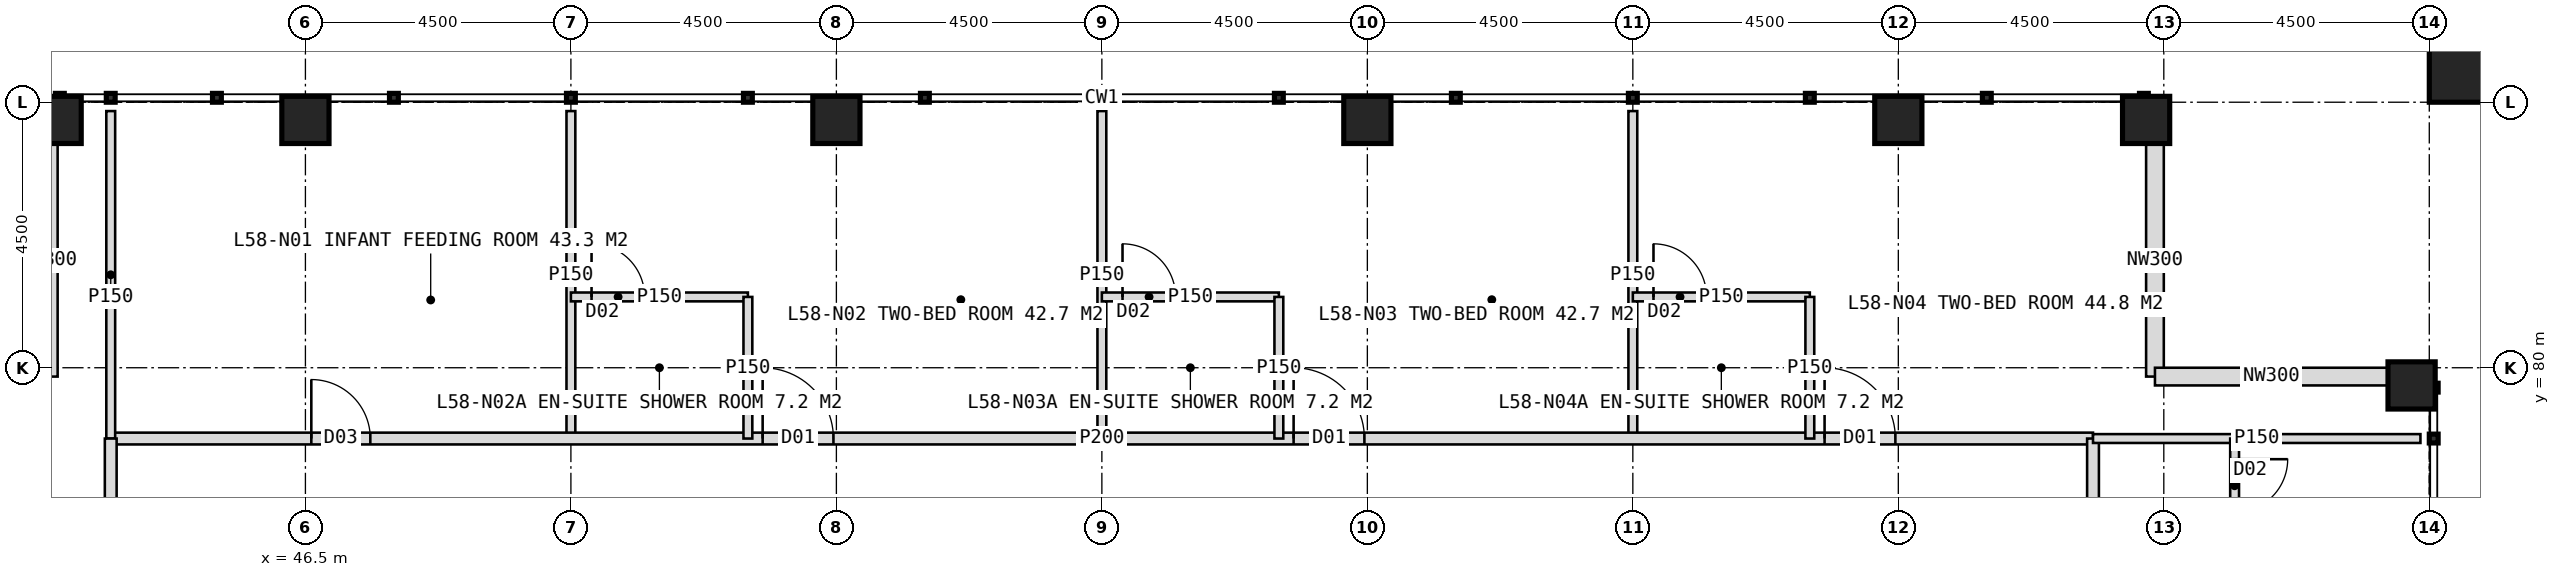
"""IFC4 building model, lengths in metres.
Left out: names, types, materials, properties, quantities, classifications, styles, units other than length and angle.
Written with IfcOpenShell. Run it as: python <this file> out.ifc"""

import sys

from ifc_helpers import new_model, si_unit, direction, frame, frame_2d, origin, origin_2d, place, context, subcontext, project, spatial, rectangle, hollow_rectangle, extrude, element, fill, save


model = new_model("IFC4")
c1 = context("Model", 3, precision=1e-05, world=origin(), true_north=direction((0.0, 1.0)))
c2 = subcontext(c1, "Body", "Model", "MODEL_VIEW")
j1 = project(units=[si_unit("LENGTHUNIT", "METRE"), si_unit("PLANEANGLEUNIT", "RADIAN")], contexts=[c1])
p1 = place(None, origin())
s1 = spatial("IfcSite", under=j1, at=p1, CompositionType="ELEMENT")
p2 = place(p1, origin())
s2 = spatial("IfcBuilding", under=s1, at=p2, CompositionType="ELEMENT")
p3 = place(p2, frame((0.0, 0.0, 241.0)))
s3 = spatial("IfcBuildingStorey", under=s2, at=p3, CompositionType="ELEMENT", Elevation=241.0)
for number, where, z_axis, x_axis in (
    (1, (42.3, 84.2, 0.0), (0.0, 0.0, 1.0), (1.0, 0.0, 0.0)),
    (2, (46.5, 84.2, 0.0), (0.0, 0.0, 1.0), (1.0, 0.0, 0.0)),
    (3, (55.5, 84.2, 0.0), (0.0, 0.0, 1.0), (1.0, 0.0, 0.0)),
    (4, (64.5, 84.2, 0.0), (0.0, 0.0, 1.0), (1.0, 0.0, 0.0)),
    (5, (73.5, 84.2, 0.0), (0.0, 0.0, 1.0), (1.0, 0.0, 0.0)),
    (6, (77.7, 84.2, 0.0), (0.0, 0.0, 1.0), (1.0, 0.0, 0.0)),
    (7, (82.2, 79.7, 0.0), (0.0, 0.0, 1.0), (1.0, 0.0, 0.0)),
):
    element("IfcColumn", number, at=place(p3, frame(where, z_axis=z_axis, x_axis=x_axis)), inside=s3, PredefinedType="COLUMN", context=c2, shape_type="SweptSolid", body=[
        extrude(hollow_rectangle(XDim=0.8, YDim=0.8, WallThickness=0.08, at=origin_2d()), origin(), (0.0, 0.0, 1.0), 4.0),
    ])
p4 = place(p3, frame((83.1, 85.1, 0.0), z_axis=(0.0, 0.0, 1.0), x_axis=(1.0, 0.0, 0.0)))
e8 = element("IfcColumn", 8, at=p4, inside=s3, PredefinedType="COLUMN", context=c2, shape_type="SweptSolid", body=[
    extrude(hollow_rectangle(XDim=1.2, YDim=1.2, WallThickness=0.07, at=origin_2d()), origin(), (0.0, 0.0, 1.0), 2.0),
])
for number, where, z_axis, x_axis in (
    (9, (77.85, 83.8, 0.0), (0.0, 0.0, 1.0), (0.0, -1.0, 0.0)),
    (10, (77.85, 79.85, 0.0), (0.0, 0.0, 1.0), (1.0, 0.0, 0.0)),
    (11, (42.15, 79.85, 0.0), (0.0, 0.0, 1.0), (0.0, 1.0, 0.0)),
):
    element("IfcWall", number, at=place(p3, frame(where, z_axis=z_axis, x_axis=x_axis)), inside=s3, PredefinedType="ELEMENTEDWALL", context=c2, shape_type="SweptSolid", body=[
        extrude(rectangle(XDim=3.95, YDim=0.3, at=frame_2d((1.975, 0.0))), origin(), (0.0, 0.0, 1.0), 2.95),
    ])
p5 = place(p3, frame((51.0, 78.8, 0.0), z_axis=(0.0, 0.0, 1.0), x_axis=(0.0, 1.0, 0.0)))
e12 = element("IfcWall", 12, at=p5, inside=s3, PredefinedType="PARTITIONING", context=c2, shape_type="SweptSolid", body=[
    extrude(rectangle(XDim=5.55, YDim=0.15, at=frame_2d((2.775, 0.0))), origin(), (0.0, 0.0, 1.0), 3.75),
])
p6 = place(p3, frame((60.0, 78.8, 0.0), z_axis=(0.0, 0.0, 1.0), x_axis=(0.0, 1.0, 0.0)))
e13 = element("IfcWall", 13, at=p6, inside=s3, PredefinedType="PARTITIONING", context=c2, shape_type="SweptSolid", body=[
    extrude(rectangle(XDim=5.55, YDim=0.15, at=frame_2d((2.775, 0.0))), origin(), (0.0, 0.0, 1.0), 2.95),
])
p7 = place(p3, frame((69.0, 78.8, 0.0), z_axis=(0.0, 0.0, 1.0), x_axis=(0.0, 1.0, 0.0)))
e14 = element("IfcWall", 14, at=p7, inside=s3, PredefinedType="PARTITIONING", context=c2, shape_type="SweptSolid", body=[
    extrude(rectangle(XDim=5.55, YDim=0.15, at=frame_2d((2.775, 0.0))), origin(), (0.0, 0.0, 1.0), 3.75),
])
p8 = place(p3, frame((43.2, 78.8, 0.0), z_axis=(0.0, 0.0, 1.0), x_axis=(1.0, 0.0, 0.0)))
e15 = element("IfcWall", 15, at=p8, inside=s3, PredefinedType="PARTITIONING", context=c2, shape_type="SweptSolid", body=[
    extrude(rectangle(XDim=33.6, YDim=0.2, at=frame_2d((16.8, 0.0))), origin(), (0.0, 0.0, 1.0), 3.75),
])
p9 = place(p8, frame((3.4, 0.0, 0.0)))
e16 = element("IfcOpeningElement", 16, at=p9, cuts=e15, PredefinedType="OPENING", context=c2, shape_type="SweptSolid", body=[
    extrude(rectangle(XDim=1.0, YDim=2.1, at=frame_2d((0.5, 1.05))), frame((0.0, 0.11, 0.0), z_axis=(0.0, -1.0, 0.0), x_axis=(1.0, 0.0, 0.0)), (0.0, 0.0, 1.0), 0.22),
])
p10 = place(p8, frame((11.05, 0.0, 0.0)))
e17 = element("IfcOpeningElement", 17, at=p10, cuts=e15, PredefinedType="OPENING", context=c2, shape_type="SweptSolid", body=[
    extrude(rectangle(XDim=1.2, YDim=2.2, at=frame_2d((0.6, 1.1))), frame((0.0, 0.11, 0.0), z_axis=(0.0, -1.0, 0.0), x_axis=(1.0, 0.0, 0.0)), (0.0, 0.0, 1.0), 0.22),
])
p11 = place(p8, frame((20.05, 0.0, 0.0)))
e18 = element("IfcOpeningElement", 18, at=p11, cuts=e15, PredefinedType="OPENING", context=c2, shape_type="SweptSolid", body=[
    extrude(rectangle(XDim=1.2, YDim=2.2, at=frame_2d((0.6, 1.1))), frame((0.0, 0.11, 0.0), z_axis=(0.0, -1.0, 0.0), x_axis=(1.0, 0.0, 0.0)), (0.0, 0.0, 1.0), 0.22),
])
p12 = place(p8, frame((29.05, 0.0, 0.0)))
e19 = element("IfcOpeningElement", 19, at=p12, cuts=e15, PredefinedType="OPENING", context=c2, shape_type="SweptSolid", body=[
    extrude(rectangle(XDim=1.2, YDim=2.2, at=frame_2d((0.6, 1.1))), frame((0.0, 0.11, 0.0), z_axis=(0.0, -1.0, 0.0), x_axis=(1.0, 0.0, 0.0)), (0.0, 0.0, 1.0), 0.22),
])
p13 = place(p3, frame((43.2, 78.8, 0.0), z_axis=(0.0, 0.0, 1.0), x_axis=(0.0, 1.0, 0.0)))
e20 = element("IfcWall", 20, at=p13, inside=s3, PredefinedType="PARTITIONING", context=c2, shape_type="SweptSolid", body=[
    extrude(rectangle(XDim=5.55, YDim=0.15, at=frame_2d((2.775, 0.0))), origin(), (0.0, 0.0, 1.0), 3.75),
])
p14 = place(p3, frame((51.0, 81.2, 0.0), z_axis=(0.0, 0.0, 1.0), x_axis=(1.0, 0.0, 0.0)))
e21 = element("IfcWall", 21, at=p14, inside=s3, PredefinedType="PARTITIONING", context=c2, shape_type="SweptSolid", body=[
    extrude(rectangle(XDim=3.0, YDim=0.15, at=frame_2d((1.5, 0.0))), origin(), (0.0, 0.0, 1.0), 3.75),
])
p15 = place(p14, frame((0.35, 0.0, 0.0)))
e22 = element("IfcOpeningElement", 22, at=p15, cuts=e21, PredefinedType="OPENING", context=c2, shape_type="SweptSolid", body=[
    extrude(rectangle(XDim=0.9, YDim=2.1, at=frame_2d((0.45, 1.05))), frame((0.0, 0.085, 0.0), z_axis=(0.0, -1.0, 0.0), x_axis=(1.0, 0.0, 0.0)), (0.0, 0.0, 1.0), 0.17),
])
p16 = place(p3, frame((54.0, 78.8, 0.0), z_axis=(0.0, 0.0, 1.0), x_axis=(0.0, 1.0, 0.0)))
e23 = element("IfcWall", 23, at=p16, inside=s3, PredefinedType="PARTITIONING", context=c2, shape_type="SweptSolid", body=[
    extrude(rectangle(XDim=2.4, YDim=0.15, at=frame_2d((1.2, 0.0))), origin(), (0.0, 0.0, 1.0), 3.75),
])
p17 = place(p3, frame((60.0, 81.2, 0.0), z_axis=(0.0, 0.0, 1.0), x_axis=(1.0, 0.0, 0.0)))
e24 = element("IfcWall", 24, at=p17, inside=s3, PredefinedType="PARTITIONING", context=c2, shape_type="SweptSolid", body=[
    extrude(rectangle(XDim=3.0, YDim=0.15, at=frame_2d((1.5, 0.0))), origin(), (0.0, 0.0, 1.0), 3.75),
])
p18 = place(p17, frame((0.35, 0.0, 0.0)))
e25 = element("IfcOpeningElement", 25, at=p18, cuts=e24, PredefinedType="OPENING", context=c2, shape_type="SweptSolid", body=[
    extrude(rectangle(XDim=0.9, YDim=2.1, at=frame_2d((0.45, 1.05))), frame((0.0, 0.085, 0.0), z_axis=(0.0, -1.0, 0.0), x_axis=(1.0, 0.0, 0.0)), (0.0, 0.0, 1.0), 0.17),
])
p19 = place(p3, frame((63.0, 78.8, 0.0), z_axis=(0.0, 0.0, 1.0), x_axis=(0.0, 1.0, 0.0)))
e26 = element("IfcWall", 26, at=p19, inside=s3, PredefinedType="PARTITIONING", context=c2, shape_type="SweptSolid", body=[
    extrude(rectangle(XDim=2.4, YDim=0.15, at=frame_2d((1.2, 0.0))), origin(), (0.0, 0.0, 1.0), 3.75),
])
p20 = place(p3, frame((69.0, 81.2, 0.0), z_axis=(0.0, 0.0, 1.0), x_axis=(1.0, 0.0, 0.0)))
e27 = element("IfcWall", 27, at=p20, inside=s3, PredefinedType="PARTITIONING", context=c2, shape_type="SweptSolid", body=[
    extrude(rectangle(XDim=3.0, YDim=0.15, at=frame_2d((1.5, 0.0))), origin(), (0.0, 0.0, 1.0), 3.75),
])
p21 = place(p20, frame((0.35, 0.0, 0.0)))
e28 = element("IfcOpeningElement", 28, at=p21, cuts=e27, PredefinedType="OPENING", context=c2, shape_type="SweptSolid", body=[
    extrude(rectangle(XDim=0.9, YDim=2.1, at=frame_2d((0.45, 1.05))), frame((0.0, 0.085, 0.0), z_axis=(0.0, -1.0, 0.0), x_axis=(1.0, 0.0, 0.0)), (0.0, 0.0, 1.0), 0.17),
])
p22 = place(p3, frame((72.0, 78.8, 0.0), z_axis=(0.0, 0.0, 1.0), x_axis=(0.0, 1.0, 0.0)))
e29 = element("IfcWall", 29, at=p22, inside=s3, PredefinedType="PARTITIONING", context=c2, shape_type="SweptSolid", body=[
    extrude(rectangle(XDim=2.4, YDim=0.15, at=frame_2d((1.2, 0.0))), origin(), (0.0, 0.0, 1.0), 3.75),
])
p23 = place(p3, frame((43.2, 45.2, 0.0), z_axis=(0.0, 0.0, 1.0), x_axis=(0.0, 1.0, 0.0)))
e30 = element("IfcWall", 30, at=p23, inside=s3, PredefinedType="PARTITIONING", context=c2, shape_type="SweptSolid", body=[
    extrude(rectangle(XDim=33.6, YDim=0.2, at=frame_2d((16.8, 0.0))), origin(), (0.0, 0.0, 1.0), 3.75),
])
p24 = place(p23, frame((2.65, 0.0, 0.0)))
e31 = element("IfcOpeningElement", 31, at=p24, cuts=e30, PredefinedType="OPENING", context=c2, shape_type="SweptSolid", body=[
    extrude(rectangle(XDim=1.2, YDim=2.2, at=frame_2d((0.6, 1.1))), frame((0.0, 0.11, 0.0), z_axis=(0.0, -1.0, 0.0), x_axis=(1.0, 0.0, 0.0)), (0.0, 0.0, 1.0), 0.22),
])
p25 = place(p23, frame((7.45, 0.0, 0.0)))
e32 = element("IfcOpeningElement", 32, at=p25, cuts=e30, PredefinedType="OPENING", context=c2, shape_type="SweptSolid", body=[
    extrude(rectangle(XDim=1.2, YDim=2.2, at=frame_2d((0.6, 1.1))), frame((0.0, 0.11, 0.0), z_axis=(0.0, -1.0, 0.0), x_axis=(1.0, 0.0, 0.0)), (0.0, 0.0, 1.0), 0.22),
])
p26 = place(p23, frame((13.45, 0.0, 0.0)))
e33 = element("IfcOpeningElement", 33, at=p26, cuts=e30, PredefinedType="OPENING", context=c2, shape_type="SweptSolid", body=[
    extrude(rectangle(XDim=1.2, YDim=2.2, at=frame_2d((0.6, 1.1))), frame((0.0, 0.11, 0.0), z_axis=(0.0, -1.0, 0.0), x_axis=(1.0, 0.0, 0.0)), (0.0, 0.0, 1.0), 0.22),
])
p27 = place(p23, frame((20.05, 0.0, 0.0)))
e34 = element("IfcOpeningElement", 34, at=p27, cuts=e30, PredefinedType="OPENING", context=c2, shape_type="SweptSolid", body=[
    extrude(rectangle(XDim=1.2, YDim=2.2, at=frame_2d((0.6, 1.1))), frame((0.0, 0.11, 0.0), z_axis=(0.0, -1.0, 0.0), x_axis=(1.0, 0.0, 0.0)), (0.0, 0.0, 1.0), 0.22),
])
p28 = place(p23, frame((29.05, 0.0, 0.0)))
e35 = element("IfcOpeningElement", 35, at=p28, cuts=e30, PredefinedType="OPENING", context=c2, shape_type="SweptSolid", body=[
    extrude(rectangle(XDim=1.2, YDim=2.2, at=frame_2d((0.6, 1.1))), frame((0.0, 0.11, 0.0), z_axis=(0.0, -1.0, 0.0), x_axis=(1.0, 0.0, 0.0)), (0.0, 0.0, 1.0), 0.22),
])
p29 = place(p3, frame((76.8, 78.8, 0.0), z_axis=(0.0, 0.0, 1.0), x_axis=(0.0, -1.0, 0.0)))
e36 = element("IfcWall", 36, at=p29, inside=s3, PredefinedType="PARTITIONING", context=c2, shape_type="SweptSolid", body=[
    extrude(rectangle(XDim=33.6, YDim=0.2, at=frame_2d((16.8, 0.0))), origin(), (0.0, 0.0, 1.0), 3.75),
])
p30 = place(p29, frame((2.65, 0.0, 0.0)))
e37 = element("IfcOpeningElement", 37, at=p30, cuts=e36, PredefinedType="OPENING", context=c2, shape_type="SweptSolid", body=[
    extrude(rectangle(XDim=1.2, YDim=2.2, at=frame_2d((0.6, 1.1))), frame((0.0, 0.11, 0.0), z_axis=(0.0, -1.0, 0.0), x_axis=(1.0, 0.0, 0.0)), (0.0, 0.0, 1.0), 0.22),
])
p31 = place(p29, frame((7.45, 0.0, 0.0)))
e38 = element("IfcOpeningElement", 38, at=p31, cuts=e36, PredefinedType="OPENING", context=c2, shape_type="SweptSolid", body=[
    extrude(rectangle(XDim=1.2, YDim=2.2, at=frame_2d((0.6, 1.1))), frame((0.0, 0.11, 0.0), z_axis=(0.0, -1.0, 0.0), x_axis=(1.0, 0.0, 0.0)), (0.0, 0.0, 1.0), 0.22),
])
p32 = place(p29, frame((13.45, 0.0, 0.0)))
e39 = element("IfcOpeningElement", 39, at=p32, cuts=e36, PredefinedType="OPENING", context=c2, shape_type="SweptSolid", body=[
    extrude(rectangle(XDim=1.2, YDim=2.2, at=frame_2d((0.6, 1.1))), frame((0.0, 0.11, 0.0), z_axis=(0.0, -1.0, 0.0), x_axis=(1.0, 0.0, 0.0)), (0.0, 0.0, 1.0), 0.22),
])
p33 = place(p29, frame((20.05, 0.0, 0.0)))
e40 = element("IfcOpeningElement", 40, at=p33, cuts=e36, PredefinedType="OPENING", context=c2, shape_type="SweptSolid", body=[
    extrude(rectangle(XDim=1.2, YDim=2.2, at=frame_2d((0.6, 1.1))), frame((0.0, 0.11, 0.0), z_axis=(0.0, -1.0, 0.0), x_axis=(1.0, 0.0, 0.0)), (0.0, 0.0, 1.0), 0.22),
])
p34 = place(p29, frame((29.05, 0.0, 0.0)))
e41 = element("IfcOpeningElement", 41, at=p34, cuts=e36, PredefinedType="OPENING", context=c2, shape_type="SweptSolid", body=[
    extrude(rectangle(XDim=1.2, YDim=2.2, at=frame_2d((0.6, 1.1))), frame((0.0, 0.11, 0.0), z_axis=(0.0, -1.0, 0.0), x_axis=(1.0, 0.0, 0.0)), (0.0, 0.0, 1.0), 0.22),
])
p35 = place(p3, frame((76.8, 78.8, 0.0), z_axis=(0.0, 0.0, 1.0), x_axis=(1.0, 0.0, 0.0)))
e42 = element("IfcWall", 42, at=p35, inside=s3, PredefinedType="PARTITIONING", context=c2, shape_type="SweptSolid", body=[
    extrude(rectangle(XDim=5.55, YDim=0.15, at=frame_2d((2.775, 0.0))), origin(), (0.0, 0.0, 1.0), 3.75),
])
p36 = place(p3, frame((79.2, 78.8, 0.0), z_axis=(0.0, 0.0, 1.0), x_axis=(0.0, -1.0, 0.0)))
e43 = element("IfcWall", 43, at=p36, inside=s3, PredefinedType="PARTITIONING", context=c2, shape_type="SweptSolid", body=[
    extrude(rectangle(XDim=2.4, YDim=0.15, at=frame_2d((1.2, 0.0))), origin(), (0.0, 0.0, 1.0), 3.75),
])
p37 = place(p36, frame((0.35, 0.0, 0.0)))
e44 = element("IfcOpeningElement", 44, at=p37, cuts=e43, PredefinedType="OPENING", context=c2, shape_type="SweptSolid", body=[
    extrude(rectangle(XDim=0.9, YDim=2.1, at=frame_2d((0.45, 1.05))), frame((0.0, 0.085, 0.0), z_axis=(0.0, -1.0, 0.0), x_axis=(1.0, 0.0, 0.0)), (0.0, 0.0, 1.0), 0.17),
])
p38 = place(p9, origin())
e45 = element("IfcDoor", 45, at=p38, inside=s3, OperationType="SINGLE_SWING_LEFT", PredefinedType="DOOR", context=c2, shape_type="SweptSolid", body=[
    extrude(rectangle(XDim=1.0, YDim=2.1, at=frame_2d((0.5, 1.05))), frame((0.0, 0.025, 0.0), z_axis=(0.0, -1.0, 0.0), x_axis=(1.0, 0.0, 0.0)), (0.0, 0.0, 1.0), 0.05),
])
fill(e16, e45)
p39 = place(p10, origin())
e46 = element("IfcDoor", 46, at=p39, inside=s3, OperationType="SINGLE_SWING_LEFT", PredefinedType="DOOR", context=c2, shape_type="SweptSolid", body=[
    extrude(rectangle(XDim=1.2, YDim=2.2, at=frame_2d((0.6, 1.1))), frame((0.0, 0.025, 0.0), z_axis=(0.0, -1.0, 0.0), x_axis=(1.0, 0.0, 0.0)), (0.0, 0.0, 1.0), 0.05),
])
fill(e17, e46)
p40 = place(p15, origin())
e47 = element("IfcDoor", 47, at=p40, inside=s3, OperationType="SINGLE_SWING_LEFT", PredefinedType="DOOR", context=c2, shape_type="SweptSolid", body=[
    extrude(rectangle(XDim=0.9, YDim=2.1, at=frame_2d((0.45, 1.05))), frame((0.0, 0.025, 0.0), z_axis=(0.0, -1.0, 0.0), x_axis=(1.0, 0.0, 0.0)), (0.0, 0.0, 1.0), 0.05),
])
fill(e22, e47)
p41 = place(p11, origin())
e48 = element("IfcDoor", 48, at=p41, inside=s3, OperationType="SINGLE_SWING_LEFT", PredefinedType="DOOR", context=c2, shape_type="SweptSolid", body=[
    extrude(rectangle(XDim=1.2, YDim=2.2, at=frame_2d((0.6, 1.1))), frame((0.0, 0.025, 0.0), z_axis=(0.0, -1.0, 0.0), x_axis=(1.0, 0.0, 0.0)), (0.0, 0.0, 1.0), 0.05),
])
fill(e18, e48)
p42 = place(p18, origin())
e49 = element("IfcDoor", 49, at=p42, inside=s3, OperationType="SINGLE_SWING_LEFT", PredefinedType="DOOR", context=c2, shape_type="SweptSolid", body=[
    extrude(rectangle(XDim=0.9, YDim=2.1, at=frame_2d((0.45, 1.05))), frame((0.0, 0.025, 0.0), z_axis=(0.0, -1.0, 0.0), x_axis=(1.0, 0.0, 0.0)), (0.0, 0.0, 1.0), 0.05),
])
fill(e25, e49)
p43 = place(p12, origin())
e50 = element("IfcDoor", 50, at=p43, inside=s3, OperationType="SINGLE_SWING_LEFT", PredefinedType="DOOR", context=c2, shape_type="SweptSolid", body=[
    extrude(rectangle(XDim=1.2, YDim=2.2, at=frame_2d((0.6, 1.1))), frame((0.0, 0.025, 0.0), z_axis=(0.0, -1.0, 0.0), x_axis=(1.0, 0.0, 0.0)), (0.0, 0.0, 1.0), 0.05),
])
fill(e19, e50)
p44 = place(p21, origin())
e51 = element("IfcDoor", 51, at=p44, inside=s3, OperationType="SINGLE_SWING_LEFT", PredefinedType="DOOR", context=c2, shape_type="SweptSolid", body=[
    extrude(rectangle(XDim=0.9, YDim=2.1, at=frame_2d((0.45, 1.05))), frame((0.0, 0.025, 0.0), z_axis=(0.0, -1.0, 0.0), x_axis=(1.0, 0.0, 0.0)), (0.0, 0.0, 1.0), 0.05),
])
fill(e28, e51)
p45 = place(p37, origin())
e52 = element("IfcDoor", 52, at=p45, inside=s3, OperationType="SINGLE_SWING_LEFT", PredefinedType="DOOR", context=c2, shape_type="SweptSolid", body=[
    extrude(rectangle(XDim=0.9, YDim=2.1, at=frame_2d((0.45, 1.05))), frame((0.0, 0.025, 0.0), z_axis=(0.0, -1.0, 0.0), x_axis=(1.0, 0.0, 0.0)), (0.0, 0.0, 1.0), 0.05),
])
fill(e44, e52)
save(model, sys.argv[1])
